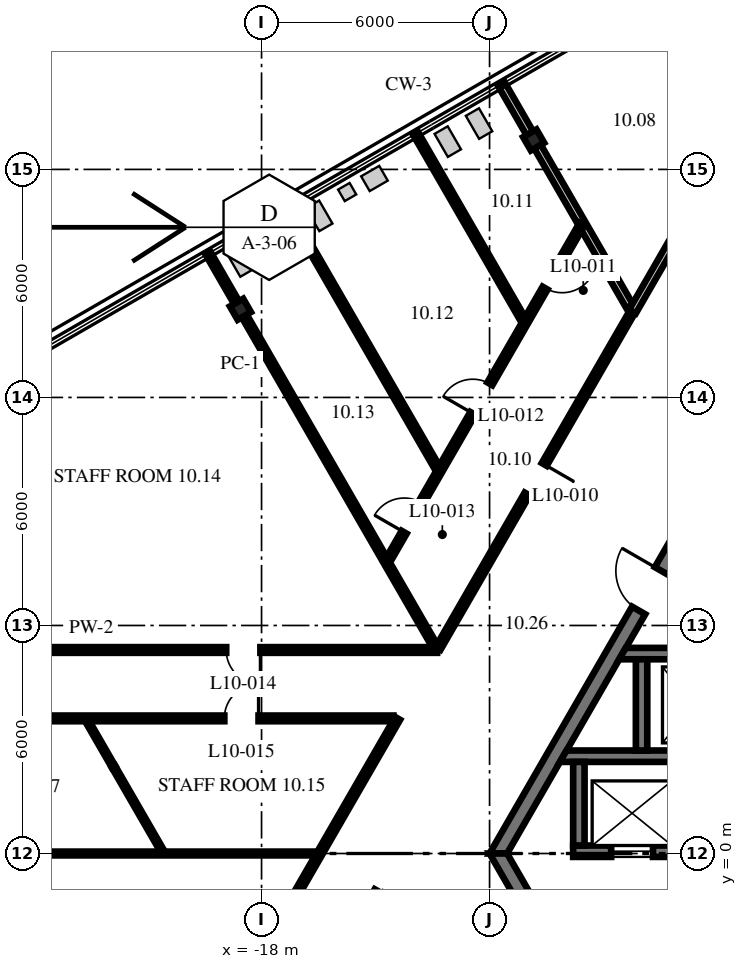
"""IFC4 building model, lengths in metres.
Left out: names, types, materials, properties, quantities, classifications, styles, units other than length and angle.
Written with IfcOpenShell. Run it as: python <this file> out.ifc"""

import sys

from ifc_helpers import new_model, si_unit, direction, frame, frame_2d, origin, origin_2d, place, context, subcontext, project, spatial, polyline, rectangle, i_section, outline, extrude, source, transform, mapped, element, fill, save


model = new_model("IFC4")
c1 = context("Model", 3, precision=1e-05, world=origin(), true_north=direction((0.0, 1.0)))
c2 = subcontext(c1, "Body", "Model", "MODEL_VIEW")
j1 = project(units=[si_unit("LENGTHUNIT", "METRE"), si_unit("PLANEANGLEUNIT", "RADIAN")], contexts=[c1])
p1 = place(None, origin())
s1 = spatial("IfcSite", under=j1, at=p1, CompositionType="ELEMENT")
p2 = place(p1, origin())
s2 = spatial("IfcBuilding", under=s1, at=p2, CompositionType="ELEMENT")
p3 = place(p2, frame((0.0, 0.0, 46.1)))
s3 = spatial("IfcBuildingStorey", under=s2, at=p3, CompositionType="ELEMENT", Elevation=46.1)
m1 = source(origin(), c2, "Body", "SweptSolid", [
    extrude(i_section(OverallWidth=0.404, OverallDepth=0.406, WebThickness=0.027, FlangeThickness=0.044, at=origin_2d()), origin(), (0.0, 0.0, 1.0), 4.3),
])
for number, where, z_axis, x_axis in (
    (1, (-10.84, 18.775, 0.0), (0.0, 0.0, 1.0), (-0.866, -0.5, 0.0)),
    (2, (-18.556, 14.32, 0.0), (0.0, 0.0, 1.0), (-0.866, -0.5, 0.0)),
):
    element("IfcColumn", number, at=place(p3, frame(where, z_axis=z_axis, x_axis=x_axis)), inside=s3, PredefinedType="COLUMN", context=c2, shape_type="MappedRepresentation", body=[
        mapped(m1, transform((0.0, 0.0, 0.0), scale=1.0)),
    ])
m2 = source(origin(), c2, "Body", "SweptSolid", [
    extrude(outline(polyline([(-0.115, -0.2), (11.885, -0.2), (11.654, 0.2), (0.115, 0.2), (-0.115, -0.2)])), origin(), (0.0, 0.0, 1.0), 4.1),
])
p4 = place(p3, frame((-5.885, 10.192, 0.0), z_axis=(0.0, 0.0, 1.0), x_axis=(-0.499996592174, -0.866027371285, 0.0)))
e3 = element("IfcWall", 3, at=p4, inside=s3, PredefinedType="SHEAR", context=c2, shape_type="MappedRepresentation", body=[
    mapped(m2, transform((0.0, 0.0, 0.0), scale=1.0)),
])
p5 = place(p4, frame((3.185, 0.0, 0.0)))
e4 = element("IfcOpeningElement", 4, at=p5, cuts=e3, PredefinedType="OPENING", context=c2, shape_type="SweptSolid", body=[
    extrude(rectangle(XDim=1.2, YDim=2.1, at=frame_2d((0.6, 1.05))), frame((0.0, 0.21, 0.0), z_axis=(0.0, -1.0, 0.0), x_axis=(1.0, 0.0, 0.0)), (0.0, 0.0, 1.0), 0.42),
])
p6 = place(p3, frame((-11.769, 0.0, 0.0), z_axis=(0.0, 0.0, 1.0), x_axis=(0.499996592174, -0.866027371285, 0.0)))
e5 = element("IfcWall", 5, at=p6, inside=s3, PredefinedType="SHEAR", context=c2, shape_type="MappedRepresentation", body=[
    mapped(m2, transform((0.0, 0.0, 0.0), scale=1.0)),
])
p7 = place(p6, frame((1.405, 0.0, 0.0)))
e6 = element("IfcOpeningElement", 6, at=p7, cuts=e5, PredefinedType="OPENING", context=c2, shape_type="SweptSolid", body=[
    extrude(rectangle(XDim=1.8, YDim=2.1, at=frame_2d((0.9, 1.05))), frame((0.0, 0.21, 0.0), z_axis=(0.0, -1.0, 0.0), x_axis=(1.0, 0.0, 0.0)), (0.0, 0.0, 1.0), 0.42),
])
p8 = place(p6, frame((7.915, 0.0, 0.0)))
e7 = element("IfcOpeningElement", 7, at=p8, cuts=e5, PredefinedType="OPENING", context=c2, shape_type="SweptSolid", body=[
    extrude(rectangle(XDim=1.2, YDim=2.1, at=frame_2d((0.6, 1.05))), frame((0.0, 0.21, 0.0), z_axis=(0.0, -1.0, 0.0), x_axis=(1.0, 0.0, 0.0)), (0.0, 0.0, 1.0), 0.42),
])
m3 = source(origin(), c2, "Body", "SweptSolid", [
    extrude(rectangle(XDim=11.5, YDim=0.3, at=frame_2d((5.75, 0.0))), origin(), (0.0, 0.0, 1.0), 4.1),
])
p9 = place(p3, frame((-9.8, 0.06, 0.0), z_axis=(0.0, 0.0, 1.0), x_axis=(1.0, 0.0, 0.0)))
e8 = element("IfcWall", 8, at=p9, inside=s3, PredefinedType="SHEAR", context=c2, shape_type="MappedRepresentation", body=[
    mapped(m3, transform((0.0, 0.0, 0.0), scale=1.0)),
])
p10 = place(p9, frame((1.0, 0.0, 0.0)))
e9 = element("IfcOpeningElement", 9, at=p10, cuts=e8, PredefinedType="OPENING", context=c2, shape_type="SweptSolid", body=[
    extrude(rectangle(XDim=1.1, YDim=2.1, at=frame_2d((0.55, 1.05))), frame((0.0, 0.16, 0.0), z_axis=(0.0, -1.0, 0.0), x_axis=(1.0, 0.0, 0.0)), (0.0, 0.0, 1.0), 0.32),
])
p11 = place(p9, frame((3.8, 0.0, 0.0)))
e10 = element("IfcOpeningElement", 10, at=p11, cuts=e8, PredefinedType="OPENING", context=c2, shape_type="SweptSolid", body=[
    extrude(rectangle(XDim=1.1, YDim=2.1, at=frame_2d((0.55, 1.05))), frame((0.0, 0.16, 0.0), z_axis=(0.0, -1.0, 0.0), x_axis=(1.0, 0.0, 0.0)), (0.0, 0.0, 1.0), 0.32),
])
p12 = place(p9, frame((6.6, 0.0, 0.0)))
e11 = element("IfcOpeningElement", 11, at=p12, cuts=e8, PredefinedType="OPENING", context=c2, shape_type="SweptSolid", body=[
    extrude(rectangle(XDim=1.1, YDim=2.1, at=frame_2d((0.55, 1.05))), frame((0.0, 0.16, 0.0), z_axis=(0.0, -1.0, 0.0), x_axis=(1.0, 0.0, 0.0)), (0.0, 0.0, 1.0), 0.32),
])
p13 = place(p9, frame((9.4, 0.0, 0.0)))
e12 = element("IfcOpeningElement", 12, at=p13, cuts=e8, PredefinedType="OPENING", context=c2, shape_type="SweptSolid", body=[
    extrude(rectangle(XDim=1.1, YDim=2.1, at=frame_2d((0.55, 1.05))), frame((0.0, 0.16, 0.0), z_axis=(0.0, -1.0, 0.0), x_axis=(1.0, 0.0, 0.0)), (0.0, 0.0, 1.0), 0.32),
])
m4 = source(origin(), c2, "Body", "SweptSolid", [
    extrude(outline(polyline([(11.2, -0.15), (-0.349, -0.15), (-0.176, 0.15), (11.2, 0.15), (11.2, -0.15)])), origin(), (0.0, 0.0, 1.0), 4.1),
])
p14 = place(p3, frame((-9.8, 2.56, 0.0), z_axis=(0.0, 0.0, 1.0), x_axis=(1.0, 0.0, 0.0)))
e13 = element("IfcWall", 13, at=p14, inside=s3, PredefinedType="SHEAR", context=c2, shape_type="MappedRepresentation", body=[
    mapped(m4, transform((0.0, 0.0, 0.0), scale=1.0)),
])
m5 = source(origin(), c2, "Body", "SweptSolid", [
    extrude(rectangle(XDim=2.2, YDim=0.3, at=frame_2d((1.1, 0.0))), origin(), (0.0, 0.0, 1.0), 4.1),
])
p15 = place(p3, frame((-9.65, 0.21, 0.0), z_axis=(0.0, 0.0, 1.0), x_axis=(0.0, 1.0, 0.0)))
e14 = element("IfcWall", 14, at=p15, inside=s3, PredefinedType="SHEAR", context=c2, shape_type="MappedRepresentation", body=[
    mapped(m5, transform((0.0, 0.0, 0.0), scale=1.0)),
])
m6 = source(origin(), c2, "Body", "SweptSolid", [
    extrude(outline(polyline([(2.6, -0.15), (-0.44, -0.15), (-0.267, 0.15), (2.6, 0.15), (2.6, -0.15)])), origin(), (0.0, 0.0, 1.0), 4.1),
])
p16 = place(p3, frame((-8.15, 5.26, 0.0), z_axis=(0.0, 0.0, 1.0), x_axis=(1.0, 0.0, 0.0)))
e15 = element("IfcWall", 15, at=p16, inside=s3, PredefinedType="SHEAR", context=c2, shape_type="MappedRepresentation", body=[
    mapped(m6, transform((0.0, 0.0, 0.0), scale=1.0)),
])
m7 = source(origin(), c2, "Body", "SweptSolid", [
    extrude(rectangle(XDim=2.4, YDim=0.3, at=frame_2d((1.2, 0.0))), origin(), (0.0, 0.0, 1.0), 4.1),
])
p17 = place(p3, frame((-8.0, 2.71, 0.0), z_axis=(0.0, 0.0, 1.0), x_axis=(0.0, 1.0, 0.0)))
e16 = element("IfcWall", 16, at=p17, inside=s3, PredefinedType="SHEAR", context=c2, shape_type="MappedRepresentation", body=[
    mapped(m7, transform((0.0, 0.0, 0.0), scale=1.0)),
])
p18 = place(p3, frame((-22.584, 3.477, 0.0), z_axis=(0.0, 0.0, 1.0), x_axis=(0.499978698016, -0.866037702141, 0.0)))
e17 = element("IfcWall", 17, at=p18, inside=s3, PredefinedType="PARTITIONING", context=c2, shape_type="SweptSolid", body=[
    extrude(rectangle(XDim=1.375, YDim=0.1, at=frame_2d((0.687, 0.0))), origin(), (0.0, 0.0, 1.0), 3.488),
])
p19 = place(p3, frame((-21.897, 2.287, 0.0), z_axis=(0.0, 0.0, 1.0), x_axis=(0.499995433041, -0.866028040503, 0.0)))
e18 = element("IfcWall", 18, at=p19, inside=s3, PredefinedType="PARTITIONING", context=c2, shape_type="SweptSolid", body=[
    extrude(rectangle(XDim=2.581, YDim=0.1, at=frame_2d((1.29, 0.0))), origin(), (0.0, 0.0, 1.0), 4.1),
])
p20 = place(p3, frame((-19.402, 15.785, 0.0), z_axis=(0.0, 0.0, 1.0), x_axis=(0.499976292358, -0.866039090965, 0.0)))
e19 = element("IfcWall", 19, at=p20, inside=s3, PredefinedType="PARTITIONING", context=c2, shape_type="SweptSolid", body=[
    extrude(rectangle(XDim=1.499, YDim=0.15, at=frame_2d((0.749, 0.0))), origin(), (0.0, 0.0, 1.0), 4.1),
])
p21 = place(p3, frame((-18.459, 14.153, 0.0), z_axis=(0.0, 0.0, 1.0), x_axis=(0.500006371327, -0.866021725266, 0.0)))
e20 = element("IfcWall", 20, at=p21, inside=s3, PredefinedType="PARTITIONING", context=c2, shape_type="SweptSolid", body=[
    extrude(rectangle(XDim=10.049, YDim=0.15, at=frame_2d((5.024, 0.0))), origin(), (0.0, 0.0, 1.0), 3.343),
])
p22 = place(p3, frame((-17.323, 16.985, 0.0), z_axis=(0.0, 0.0, 1.0), x_axis=(0.500001837861, -0.866024342692, 0.0)))
e21 = element("IfcWall", 21, at=p22, inside=s3, PredefinedType="PARTITIONING", context=c2, shape_type="SweptSolid", body=[
    extrude(rectangle(XDim=7.892, YDim=0.15, at=frame_2d((3.946, 0.0))), origin(), (0.0, 0.0, 1.0), 4.1),
])
p23 = place(p3, frame((-13.941, 18.938, 0.0), z_axis=(0.0, 0.0, 1.0), x_axis=(0.500009875128, -0.866019702301, 0.0)))
e22 = element("IfcWall", 22, at=p23, inside=s3, PredefinedType="PARTITIONING", context=c2, shape_type="SweptSolid", body=[
    extrude(rectangle(XDim=5.637, YDim=0.15, at=frame_2d((2.819, 0.0))), origin(), (0.0, 0.0, 1.0), 4.1),
])
m8 = source(origin(), c2, "Body", "SweptSolid", [
    extrude(rectangle(XDim=1.499, YDim=0.2, at=frame_2d((0.749, 0.0))), origin(), (0.0, 0.0, 1.0), 4.1),
])
p24 = place(p3, frame((-11.686, 20.24, 0.0), z_axis=(0.0, 0.0, 1.0), x_axis=(0.499976292358, -0.866039090965, 0.0)))
e23 = element("IfcWall", 23, at=p24, inside=s3, PredefinedType="PARTITIONING", context=c2, shape_type="MappedRepresentation", body=[
    mapped(m8, transform((0.0, 0.0, 0.0), scale=1.0)),
])
p25 = place(p3, frame((-10.743, 18.608, 0.0), z_axis=(0.0, 0.0, 1.0), x_axis=(0.500030907386, -0.866007558661, 0.0)))
e24 = element("IfcWall", 24, at=p25, inside=s3, PredefinedType="PARTITIONING", context=c2, shape_type="SweptSolid", body=[
    extrude(rectangle(XDim=4.865, YDim=0.2, at=frame_2d((2.432, 0.0))), origin(), (0.0, 0.0, 1.0), 3.488),
])
p26 = place(p3, frame((-24.618, 0.0, 0.0), z_axis=(0.0, 0.0, 1.0), x_axis=(1.0, 0.0, 0.0)))
e25 = element("IfcWall", 25, at=p26, inside=s3, PredefinedType="PARTITIONING", context=c2, shape_type="SweptSolid", body=[
    extrude(rectangle(XDim=8.056, YDim=0.1, at=frame_2d((4.028, 0.0))), origin(), (0.0, 0.0, 1.0), 4.1),
])
p27 = place(p3, frame((-30.77, 3.555, 0.0), z_axis=(0.0, 0.0, 1.0), x_axis=(1.0, 0.0, 0.0)))
e26 = element("IfcWall", 26, at=p27, inside=s3, PredefinedType="PARTITIONING", context=c2, shape_type="SweptSolid", body=[
    extrude(rectangle(XDim=16.24, YDim=0.15, at=frame_2d((8.12, 0.0))), origin(), (0.0, 0.0, 1.0), 4.1),
])
p28 = place(p27, frame((11.791, 0.0, 0.0)))
e27 = element("IfcOpeningElement", 27, at=p28, cuts=e26, PredefinedType="OPENING", context=c2, shape_type="SweptSolid", body=[
    extrude(rectangle(XDim=0.9, YDim=2.1, at=frame_2d((0.45, 1.05))), frame((0.0, 0.085, 0.0), z_axis=(0.0, -1.0, 0.0), x_axis=(1.0, 0.0, 0.0)), (0.0, 0.0, 1.0), 0.17),
])
p29 = place(p27, frame((3.644, 0.0, 0.0)))
e28 = element("IfcOpeningElement", 28, at=p29, cuts=e26, PredefinedType="OPENING", context=c2, shape_type="SweptSolid", body=[
    extrude(rectangle(XDim=0.9, YDim=2.1, at=frame_2d((0.45, 1.05))), frame((0.0, 0.085, 0.0), z_axis=(0.0, -1.0, 0.0), x_axis=(1.0, 0.0, 0.0)), (0.0, 0.0, 1.0), 0.17),
])
p30 = place(p3, frame((-31.584, 5.355, 0.0), z_axis=(0.0, 0.0, 1.0), x_axis=(1.0, 0.0, 0.0)))
e29 = element("IfcWall", 29, at=p30, inside=s3, PredefinedType="PARTITIONING", context=c2, shape_type="SweptSolid", body=[
    extrude(rectangle(XDim=18.204, YDim=0.15, at=frame_2d((9.102, 0.0))), origin(), (0.0, 0.0, 1.0), 4.1),
])
p31 = place(p30, frame((12.654, 0.0, 0.0)))
e30 = element("IfcOpeningElement", 30, at=p31, cuts=e29, PredefinedType="OPENING", context=c2, shape_type="SweptSolid", body=[
    extrude(rectangle(XDim=0.9, YDim=2.1, at=frame_2d((0.45, 1.05))), frame((0.0, 0.085, 0.0), z_axis=(0.0, -1.0, 0.0), x_axis=(1.0, 0.0, 0.0)), (0.0, 0.0, 1.0), 0.17),
])
p32 = place(p30, frame((3.465, 0.0, 0.0)))
e31 = element("IfcOpeningElement", 31, at=p32, cuts=e29, PredefinedType="OPENING", context=c2, shape_type="SweptSolid", body=[
    extrude(rectangle(XDim=0.9, YDim=2.1, at=frame_2d((0.45, 1.05))), frame((0.0, 0.085, 0.0), z_axis=(0.0, -1.0, 0.0), x_axis=(1.0, 0.0, 0.0)), (0.0, 0.0, 1.0), 0.17),
])
p33 = place(p3, frame((-24.04, -13.108, 0.0), z_axis=(0.0, 0.0, 1.0), x_axis=(0.500008033299, 0.866020765707, 0.0)))
e32 = element("IfcWall", 32, at=p33, inside=s3, PredefinedType="PARTITIONING", context=c2, shape_type="SweptSolid", body=[
    extrude(rectangle(XDim=19.24, YDim=0.15, at=frame_2d((9.62, 0.0))), origin(), (0.0, 0.0, 1.0), 4.1),
])
p34 = place(p33, frame((4.852, 0.0, 0.0)))
e33 = element("IfcOpeningElement", 33, at=p34, cuts=e32, PredefinedType="OPENING", context=c2, shape_type="SweptSolid", body=[
    extrude(rectangle(XDim=0.9, YDim=2.1, at=frame_2d((0.45, 1.05))), frame((0.0, 0.085, 0.0), z_axis=(0.0, -1.0, 0.0), x_axis=(1.0, 0.0, 0.0)), (0.0, 0.0, 1.0), 0.17),
])
p35 = place(p3, frame((-13.355, 5.398, 0.0), z_axis=(0.0, 0.0, 1.0), x_axis=(0.499984682238, 0.866034247318, 0.0)))
e34 = element("IfcWall", 34, at=p35, inside=s3, PredefinedType="PARTITIONING", context=c2, shape_type="SweptSolid", body=[
    extrude(rectangle(XDim=10.235, YDim=0.15, at=frame_2d((5.118, 0.0))), origin(), (0.0, 0.0, 1.0), 4.1),
])
p36 = place(p35, frame((4.688, 0.0, 0.0)))
e35 = element("IfcOpeningElement", 35, at=p36, cuts=e34, PredefinedType="OPENING", context=c2, shape_type="SweptSolid", body=[
    extrude(rectangle(XDim=0.9, YDim=2.1, at=frame_2d((0.45, 1.05))), frame((0.0, 0.085, 0.0), z_axis=(0.0, -1.0, 0.0), x_axis=(1.0, 0.0, 0.0)), (0.0, 0.0, 1.0), 0.17),
])
p37 = place(p3, frame((-8.238, 14.262, 0.0), z_axis=(0.0, 0.0, 1.0), x_axis=(0.500019063067, 0.866014397438, 0.0)))
e36 = element("IfcWall", 36, at=p37, inside=s3, PredefinedType="PARTITIONING", context=c2, shape_type="SweptSolid", body=[
    extrude(rectangle(XDim=10.07, YDim=0.2, at=frame_2d((5.035, 0.0))), origin(), (0.0, 0.0, 1.0), 4.1),
])
p38 = place(p37, frame((4.742, 0.0, 0.0)))
e37 = element("IfcOpeningElement", 37, at=p38, cuts=e36, PredefinedType="OPENING", context=c2, shape_type="SweptSolid", body=[
    extrude(rectangle(XDim=0.9, YDim=2.1, at=frame_2d((0.45, 1.05))), frame((0.0, 0.11, 0.0), z_axis=(0.0, -1.0, 0.0), x_axis=(1.0, 0.0, 0.0)), (0.0, 0.0, 1.0), 0.22),
])
p39 = place(p3, frame((-14.708, 7.655, 0.0), z_axis=(0.0, 0.0, 1.0), x_axis=(0.500000437373, 0.866025151267, 0.0)))
e38 = element("IfcWall", 38, at=p39, inside=s3, PredefinedType="PARTITIONING", context=c2, shape_type="SweptSolid", body=[
    extrude(rectangle(XDim=10.289, YDim=0.15, at=frame_2d((5.144, 0.0))), origin(), (0.0, 0.0, 1.0), 4.1),
])
p40 = place(p39, frame((8.338, 0.0, 0.0)))
e39 = element("IfcOpeningElement", 39, at=p40, cuts=e38, PredefinedType="OPENING", context=c2, shape_type="SweptSolid", body=[
    extrude(rectangle(XDim=0.9, YDim=2.1, at=frame_2d((0.45, 1.05))), frame((0.0, 0.085, 0.0), z_axis=(0.0, -1.0, 0.0), x_axis=(1.0, 0.0, 0.0)), (0.0, 0.0, 1.0), 0.17),
])
p41 = place(p39, frame((4.531, 0.0, 0.0)))
e40 = element("IfcOpeningElement", 40, at=p41, cuts=e38, PredefinedType="OPENING", context=c2, shape_type="SweptSolid", body=[
    extrude(rectangle(XDim=0.9, YDim=2.1, at=frame_2d((0.45, 1.05))), frame((0.0, 0.085, 0.0), z_axis=(0.0, -1.0, 0.0), x_axis=(1.0, 0.0, 0.0)), (0.0, 0.0, 1.0), 0.17),
])
p42 = place(p39, frame((0.921, 0.0, 0.0)))
e41 = element("IfcOpeningElement", 41, at=p42, cuts=e38, PredefinedType="OPENING", context=c2, shape_type="SweptSolid", body=[
    extrude(rectangle(XDim=0.9, YDim=2.1, at=frame_2d((0.45, 1.05))), frame((0.0, 0.085, 0.0), z_axis=(0.0, -1.0, 0.0), x_axis=(1.0, 0.0, 0.0)), (0.0, 0.0, 1.0), 0.17),
])
p43 = place(p5, frame((1.2, 0.0, 0.0), z_axis=(0.0, 0.0, 1.0), x_axis=(-1.0, 0.0, 0.0)))
e42 = element("IfcDoor", 42, at=p43, inside=s3, OperationType="SINGLE_SWING_RIGHT", PredefinedType="DOOR", context=c2, shape_type="SweptSolid", body=[
    extrude(rectangle(XDim=1.2, YDim=2.1, at=frame_2d((0.6, 1.05))), frame((0.0, 0.025, 0.0), z_axis=(0.0, -1.0, 0.0), x_axis=(1.0, 0.0, 0.0)), (0.0, 0.0, 1.0), 0.05),
])
fill(e4, e42)
p44 = place(p10, origin())
e43 = element("IfcDoor", 43, at=p44, inside=s3, OperationType="DOUBLE_DOOR_SLIDING", PredefinedType="DOOR", context=c2, shape_type="SweptSolid", body=[
    extrude(rectangle(XDim=1.1, YDim=2.1, at=frame_2d((0.55, 1.05))), frame((0.0, 0.025, 0.0), z_axis=(0.0, -1.0, 0.0), x_axis=(1.0, 0.0, 0.0)), (0.0, 0.0, 1.0), 0.05),
])
fill(e9, e43)
p45 = place(p36, origin())
e44 = element("IfcDoor", 44, at=p45, inside=s3, OperationType="SINGLE_SWING_RIGHT", PredefinedType="DOOR", context=c2, shape_type="SweptSolid", body=[
    extrude(rectangle(XDim=0.9, YDim=2.1, at=frame_2d((0.45, 1.05))), frame((0.0, 0.025, 0.0), z_axis=(0.0, -1.0, 0.0), x_axis=(1.0, 0.0, 0.0)), (0.0, 0.0, 1.0), 0.05),
])
fill(e35, e44)
p46 = place(p40, origin())
e45 = element("IfcDoor", 45, at=p46, inside=s3, OperationType="SINGLE_SWING_RIGHT", PredefinedType="DOOR", context=c2, shape_type="SweptSolid", body=[
    extrude(rectangle(XDim=0.9, YDim=2.1, at=frame_2d((0.45, 1.05))), frame((0.0, 0.025, 0.0), z_axis=(0.0, -1.0, 0.0), x_axis=(1.0, 0.0, 0.0)), (0.0, 0.0, 1.0), 0.05),
])
fill(e39, e45)
p47 = place(p41, origin())
e46 = element("IfcDoor", 46, at=p47, inside=s3, OperationType="SINGLE_SWING_LEFT", PredefinedType="DOOR", context=c2, shape_type="SweptSolid", body=[
    extrude(rectangle(XDim=0.9, YDim=2.1, at=frame_2d((0.45, 1.05))), frame((0.0, 0.025, 0.0), z_axis=(0.0, -1.0, 0.0), x_axis=(1.0, 0.0, 0.0)), (0.0, 0.0, 1.0), 0.05),
])
fill(e40, e46)
p48 = place(p42, origin())
e47 = element("IfcDoor", 47, at=p48, inside=s3, OperationType="SINGLE_SWING_LEFT", PredefinedType="DOOR", context=c2, shape_type="SweptSolid", body=[
    extrude(rectangle(XDim=0.9, YDim=2.1, at=frame_2d((0.45, 1.05))), frame((0.0, 0.025, 0.0), z_axis=(0.0, -1.0, 0.0), x_axis=(1.0, 0.0, 0.0)), (0.0, 0.0, 1.0), 0.05),
])
fill(e41, e47)
p49 = place(p31, origin())
e48 = element("IfcDoor", 48, at=p49, inside=s3, OperationType="SINGLE_SWING_RIGHT", PredefinedType="DOOR", context=c2, shape_type="SweptSolid", body=[
    extrude(rectangle(XDim=0.9, YDim=2.1, at=frame_2d((0.45, 1.05))), frame((0.0, 0.025, 0.0), z_axis=(0.0, -1.0, 0.0), x_axis=(1.0, 0.0, 0.0)), (0.0, 0.0, 1.0), 0.05),
])
fill(e30, e48)
p50 = place(p28, origin())
e49 = element("IfcDoor", 49, at=p50, inside=s3, OperationType="SINGLE_SWING_LEFT", PredefinedType="DOOR", context=c2, shape_type="SweptSolid", body=[
    extrude(rectangle(XDim=0.9, YDim=2.1, at=frame_2d((0.45, 1.05))), frame((0.0, 0.025, 0.0), z_axis=(0.0, -1.0, 0.0), x_axis=(1.0, 0.0, 0.0)), (0.0, 0.0, 1.0), 0.05),
])
fill(e27, e49)
save(model, sys.argv[1])
